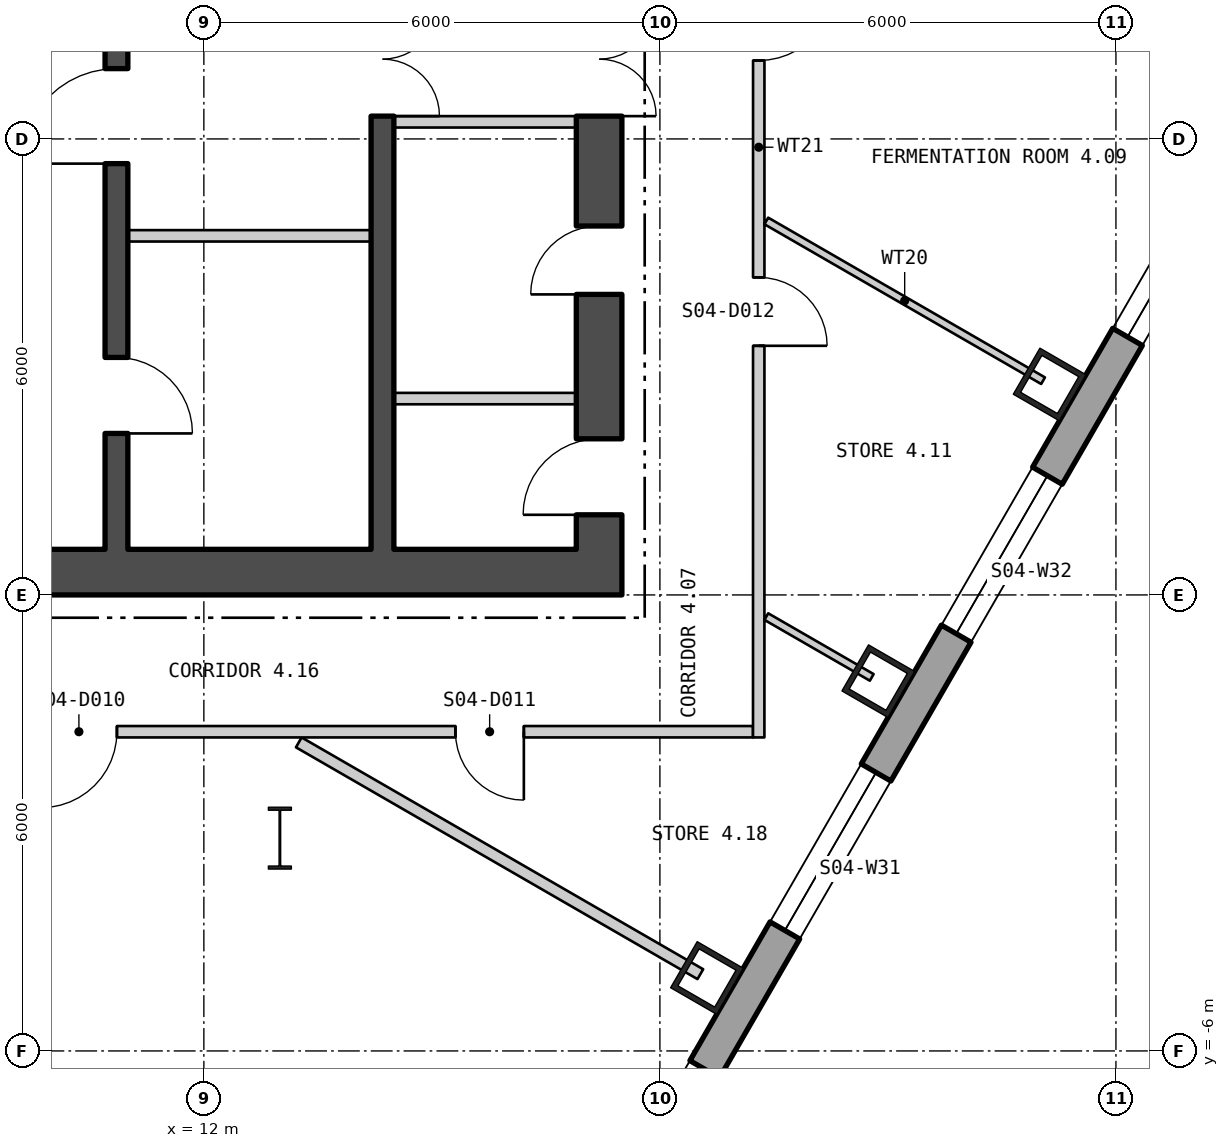
"""IFC4 building model, lengths in metres.
Left out: names, types, materials, properties, quantities, classifications, styles, units other than length and angle.
Written with IfcOpenShell. Run it as: python <this file> out.ifc"""

import sys

from ifc_helpers import new_model, si_unit, direction, frame, frame_2d, origin, origin_2d, place, context, subcontext, project, spatial, polyline, rectangle, hollow_rectangle, i_section, outline, extrude, element, fill, save


model = new_model("IFC4")
c1 = context("Model", 3, precision=1e-05, world=origin(), true_north=direction((0.0, 1.0)))
c2 = subcontext(c1, "Body", "Model", "MODEL_VIEW")
j1 = project(units=[si_unit("LENGTHUNIT", "METRE"), si_unit("PLANEANGLEUNIT", "RADIAN")], contexts=[c1])
p1 = place(None, origin())
s1 = spatial("IfcSite", under=j1, at=p1, CompositionType="ELEMENT")
p2 = place(p1, origin())
s2 = spatial("IfcBuilding", under=s1, at=p2, CompositionType="ELEMENT")
p3 = place(p2, frame((0.0, 0.0, 60.3)))
s3 = spatial("IfcBuildingStorey", under=s2, at=p3, CompositionType="ELEMENT", Elevation=60.3)
for number, where, z_axis, x_axis in (
    (1, (18.619, -5.04, 0.0), (0.0, 0.0, 1.0), (0.5, 0.866, 0.0)),
    (2, (20.873, -1.135, 0.0), (0.0, 0.0, 1.0), (0.5, 0.866, 0.0)),
    (3, (23.128, 2.769, 0.0), (0.0, 0.0, 1.0), (0.5, 0.866, 0.0)),
):
    element("IfcColumn", number, at=place(p3, frame(where, z_axis=z_axis, x_axis=x_axis)), inside=s3, PredefinedType="COLUMN", context=c2, shape_type="SweptSolid", body=[
        extrude(hollow_rectangle(XDim=0.7, YDim=0.7, WallThickness=0.07, at=origin_2d()), origin(), (0.0, 0.0, 1.0), 4.5),
    ])
p4 = place(p3, frame((13.0, -3.2, 0.0), z_axis=(0.0, 0.0, 1.0), x_axis=(1.0, 0.0, 0.0)))
e4 = element("IfcColumn", 4, at=p4, inside=s3, PredefinedType="COLUMN", context=c2, shape_type="SweptSolid", body=[
    extrude(i_section(OverallWidth=0.303, OverallDepth=0.814, WebThickness=0.021, FlangeThickness=0.04, at=origin_2d()), origin(), (0.0, 0.0, 1.0), 4.5),
])
p5 = place(p3, frame((5.425, -29.042, -0.18), z_axis=(0.0, 0.0, 1.0), x_axis=(0.499999388847, 0.866025756634, 0.0)))
e5 = element("IfcWall", 5, at=p5, inside=s3, PredefinedType="SOLIDWALL", context=c2, shape_type="SweptSolid", body=[
    extrude(outline(polyline([(-0.13, -0.225), (45.88, -0.225), (45.62, 0.225), (0.13, 0.225), (-0.13, -0.225)])), origin(), (0.0, 0.0, 1.0), 4.28),
])
p6 = place(p5, frame((1.425, 0.0, 1.08)))
e6 = element("IfcOpeningElement", 6, at=p6, cuts=e5, PredefinedType="OPENING", context=c2, shape_type="SweptSolid", body=[
    extrude(rectangle(XDim=2.4, YDim=2.6, at=frame_2d((1.2, 1.3))), frame((0.0, 0.235, 0.0), z_axis=(0.0, -1.0, 0.0), x_axis=(1.0, 0.0, 0.0)), (0.0, 0.0, 1.0), 0.47),
])
p7 = place(p5, frame((5.895, 0.0, 1.08)))
e7 = element("IfcOpeningElement", 7, at=p7, cuts=e5, PredefinedType="OPENING", context=c2, shape_type="SweptSolid", body=[
    extrude(rectangle(XDim=2.4, YDim=2.6, at=frame_2d((1.2, 1.3))), frame((0.0, 0.235, 0.0), z_axis=(0.0, -1.0, 0.0), x_axis=(1.0, 0.0, 0.0)), (0.0, 0.0, 1.0), 0.47),
])
p8 = place(p5, frame((10.403, 0.0, 1.08)))
e8 = element("IfcOpeningElement", 8, at=p8, cuts=e5, PredefinedType="OPENING", context=c2, shape_type="SweptSolid", body=[
    extrude(rectangle(XDim=2.4, YDim=2.6, at=frame_2d((1.2, 1.3))), frame((0.0, 0.235, 0.0), z_axis=(0.0, -1.0, 0.0), x_axis=(1.0, 0.0, 0.0)), (0.0, 0.0, 1.0), 0.47),
])
p9 = place(p5, frame((14.912, 0.0, 1.08)))
e9 = element("IfcOpeningElement", 9, at=p9, cuts=e5, PredefinedType="OPENING", context=c2, shape_type="SweptSolid", body=[
    extrude(rectangle(XDim=2.4, YDim=2.6, at=frame_2d((1.2, 1.3))), frame((0.0, 0.235, 0.0), z_axis=(0.0, -1.0, 0.0), x_axis=(1.0, 0.0, 0.0)), (0.0, 0.0, 1.0), 0.47),
])
p10 = place(p5, frame((19.421, 0.0, 1.08)))
e10 = element("IfcOpeningElement", 10, at=p10, cuts=e5, PredefinedType="OPENING", context=c2, shape_type="SweptSolid", body=[
    extrude(rectangle(XDim=2.4, YDim=2.6, at=frame_2d((1.2, 1.3))), frame((0.0, 0.235, 0.0), z_axis=(0.0, -1.0, 0.0), x_axis=(1.0, 0.0, 0.0)), (0.0, 0.0, 1.0), 0.47),
])
p11 = place(p5, frame((23.929, 0.0, 1.08)))
e11 = element("IfcOpeningElement", 11, at=p11, cuts=e5, PredefinedType="OPENING", context=c2, shape_type="SweptSolid", body=[
    extrude(rectangle(XDim=2.4, YDim=2.6, at=frame_2d((1.2, 1.3))), frame((0.0, 0.235, 0.0), z_axis=(0.0, -1.0, 0.0), x_axis=(1.0, 0.0, 0.0)), (0.0, 0.0, 1.0), 0.47),
])
p12 = place(p5, frame((28.438, 0.0, 1.08)))
e12 = element("IfcOpeningElement", 12, at=p12, cuts=e5, PredefinedType="OPENING", context=c2, shape_type="SweptSolid", body=[
    extrude(rectangle(XDim=2.4, YDim=2.6, at=frame_2d((1.2, 1.3))), frame((0.0, 0.235, 0.0), z_axis=(0.0, -1.0, 0.0), x_axis=(1.0, 0.0, 0.0)), (0.0, 0.0, 1.0), 0.47),
])
p13 = place(p5, frame((32.947, 0.0, 1.08)))
e13 = element("IfcOpeningElement", 13, at=p13, cuts=e5, PredefinedType="OPENING", context=c2, shape_type="SweptSolid", body=[
    extrude(rectangle(XDim=2.4, YDim=2.6, at=frame_2d((1.2, 1.3))), frame((0.0, 0.235, 0.0), z_axis=(0.0, -1.0, 0.0), x_axis=(1.0, 0.0, 0.0)), (0.0, 0.0, 1.0), 0.47),
])
p14 = place(p5, frame((37.455, 0.0, 1.08)))
e14 = element("IfcOpeningElement", 14, at=p14, cuts=e5, PredefinedType="OPENING", context=c2, shape_type="SweptSolid", body=[
    extrude(rectangle(XDim=2.4, YDim=2.6, at=frame_2d((1.2, 1.3))), frame((0.0, 0.235, 0.0), z_axis=(0.0, -1.0, 0.0), x_axis=(1.0, 0.0, 0.0)), (0.0, 0.0, 1.0), 0.47),
])
p15 = place(p5, frame((41.925, 0.0, 1.08)))
e15 = element("IfcOpeningElement", 15, at=p15, cuts=e5, PredefinedType="OPENING", context=c2, shape_type="SweptSolid", body=[
    extrude(rectangle(XDim=2.4, YDim=2.6, at=frame_2d((1.2, 1.3))), frame((0.0, 0.235, 0.0), z_axis=(0.0, -1.0, 0.0), x_axis=(1.0, 0.0, 0.0)), (0.0, 0.0, 1.0), 0.47),
])
p16 = place(p3, frame((-17.5, 0.3, 0.0), z_axis=(0.0, 0.0, 1.0), x_axis=(1.0, 0.0, 0.0)))
e16 = element("IfcWall", 16, at=p16, inside=s3, PredefinedType="SHEAR", context=c2, shape_type="SweptSolid", body=[
    extrude(rectangle(XDim=35.0, YDim=0.6, at=frame_2d((17.5, 0.0))), origin(), (0.0, 0.0, 1.0), 4.3),
])
p17 = place(p16, frame((12.0, 0.0, 0.0)))
e17 = element("IfcOpeningElement", 17, at=p17, cuts=e16, PredefinedType="OPENING", context=c2, shape_type="SweptSolid", body=[
    extrude(rectangle(XDim=1.8, YDim=2.4, at=frame_2d((0.9, 1.2))), frame((0.0, 0.31, 0.0), z_axis=(0.0, -1.0, 0.0), x_axis=(1.0, 0.0, 0.0)), (0.0, 0.0, 1.0), 0.62),
])
p18 = place(p16, frame((22.0, 0.0, 0.0)))
e18 = element("IfcOpeningElement", 18, at=p18, cuts=e16, PredefinedType="OPENING", context=c2, shape_type="SweptSolid", body=[
    extrude(rectangle(XDim=1.8, YDim=2.4, at=frame_2d((0.9, 1.2))), frame((0.0, 0.31, 0.0), z_axis=(0.0, -1.0, 0.0), x_axis=(1.0, 0.0, 0.0)), (0.0, 0.0, 1.0), 0.62),
])
p19 = place(p3, frame((17.2, 0.6, 0.0), z_axis=(0.0, 0.0, 1.0), x_axis=(0.0, 1.0, 0.0)))
e19 = element("IfcWall", 19, at=p19, inside=s3, PredefinedType="SHEAR", context=c2, shape_type="SweptSolid", body=[
    extrude(rectangle(XDim=16.8, YDim=0.6, at=frame_2d((8.4, 0.0))), origin(), (0.0, 0.0, 1.0), 4.3),
])
p20 = place(p19, frame((5.7, 0.0, 0.0)))
e20 = element("IfcOpeningElement", 20, at=p20, cuts=e19, PredefinedType="OPENING", context=c2, shape_type="SweptSolid", body=[
    extrude(rectangle(XDim=1.5, YDim=2.1, at=frame_2d((0.75, 1.05))), frame((0.0, 0.31, 0.0), z_axis=(0.0, -1.0, 0.0), x_axis=(1.0, 0.0, 0.0)), (0.0, 0.0, 1.0), 0.62),
])
p21 = place(p19, frame((0.454, 0.0, 0.0)))
e21 = element("IfcOpeningElement", 21, at=p21, cuts=e19, PredefinedType="OPENING", context=c2, shape_type="SweptSolid", body=[
    extrude(rectangle(XDim=1.0, YDim=2.1, at=frame_2d((0.5, 1.05))), frame((0.0, 0.31, 0.0), z_axis=(0.0, -1.0, 0.0), x_axis=(1.0, 0.0, 0.0)), (0.0, 0.0, 1.0), 0.62),
])
p22 = place(p19, frame((3.354, 0.0, 0.0)))
e22 = element("IfcOpeningElement", 22, at=p22, cuts=e19, PredefinedType="OPENING", context=c2, shape_type="SweptSolid", body=[
    extrude(rectangle(XDim=0.9, YDim=2.1, at=frame_2d((0.45, 1.05))), frame((0.0, 0.31, 0.0), z_axis=(0.0, -1.0, 0.0), x_axis=(1.0, 0.0, 0.0)), (0.0, 0.0, 1.0), 0.62),
])
p23 = place(p19, frame((10.527, 0.0, 0.0)))
e23 = element("IfcOpeningElement", 23, at=p23, cuts=e19, PredefinedType="OPENING", context=c2, shape_type="SweptSolid", body=[
    extrude(rectangle(XDim=0.9, YDim=2.1, at=frame_2d((0.45, 1.05))), frame((0.0, 0.31, 0.0), z_axis=(0.0, -1.0, 0.0), x_axis=(1.0, 0.0, 0.0)), (0.0, 0.0, 1.0), 0.62),
])
p24 = place(p19, frame((15.327, 0.0, 0.0)))
e24 = element("IfcOpeningElement", 24, at=p24, cuts=e19, PredefinedType="OPENING", context=c2, shape_type="SweptSolid", body=[
    extrude(rectangle(XDim=0.9, YDim=2.1, at=frame_2d((0.45, 1.05))), frame((0.0, 0.31, 0.0), z_axis=(0.0, -1.0, 0.0), x_axis=(1.0, 0.0, 0.0)), (0.0, 0.0, 1.0), 0.62),
])
p25 = place(p3, frame((10.85, 0.6, 0.0), z_axis=(0.0, 0.0, 1.0), x_axis=(0.0, 1.0, 0.0)))
e25 = element("IfcWall", 25, at=p25, inside=s3, PredefinedType="SHEAR", context=c2, shape_type="SweptSolid", body=[
    extrude(rectangle(XDim=16.8, YDim=0.3, at=frame_2d((8.4, 0.0))), origin(), (0.0, 0.0, 1.0), 4.3),
])
p26 = place(p25, frame((5.075, 0.0, 0.0)))
e26 = element("IfcOpeningElement", 26, at=p26, cuts=e25, PredefinedType="OPENING", context=c2, shape_type="SweptSolid", body=[
    extrude(rectangle(XDim=1.25, YDim=2.1, at=frame_2d((0.625, 1.05))), frame((0.0, 0.16, 0.0), z_axis=(0.0, -1.0, 0.0), x_axis=(1.0, 0.0, 0.0)), (0.0, 0.0, 1.0), 0.32),
])
p27 = place(p25, frame((1.525, 0.0, 0.0)))
e27 = element("IfcOpeningElement", 27, at=p27, cuts=e25, PredefinedType="OPENING", context=c2, shape_type="SweptSolid", body=[
    extrude(rectangle(XDim=1.0, YDim=2.1, at=frame_2d((0.5, 1.05))), frame((0.0, 0.16, 0.0), z_axis=(0.0, -1.0, 0.0), x_axis=(1.0, 0.0, 0.0)), (0.0, 0.0, 1.0), 0.32),
])
p28 = place(p3, frame((14.35, 0.6, 0.0), z_axis=(0.0, 0.0, 1.0), x_axis=(0.0, 1.0, 0.0)))
e28 = element("IfcWall", 28, at=p28, inside=s3, PredefinedType="SHEAR", context=c2, shape_type="SweptSolid", body=[
    extrude(rectangle(XDim=16.8, YDim=0.3, at=frame_2d((8.4, 0.0))), origin(), (0.0, 0.0, 1.0), 4.3),
])
p29 = place(p28, frame((5.7, 0.0, 0.0)))
e29 = element("IfcOpeningElement", 29, at=p29, cuts=e28, PredefinedType="OPENING", context=c2, shape_type="SweptSolid", body=[
    extrude(rectangle(XDim=1.5, YDim=2.1, at=frame_2d((0.75, 1.05))), frame((0.0, 0.16, 0.0), z_axis=(0.0, -1.0, 0.0), x_axis=(1.0, 0.0, 0.0)), (0.0, 0.0, 1.0), 0.32),
])
p30 = place(p3, frame((11.0, 4.725, 0.0), z_axis=(0.0, 0.0, 1.0), x_axis=(1.0, 0.0, 0.0)))
e30 = element("IfcWall", 30, at=p30, inside=s3, PredefinedType="PARTITIONING", context=c2, shape_type="SweptSolid", body=[
    extrude(rectangle(XDim=3.2, YDim=0.15, at=frame_2d((1.6, 0.0))), origin(), (0.0, 0.0, 1.0), 4.3),
])
for number, where, z_axis, x_axis in (
    (31, (14.5, 6.225, 0.0), (0.0, 0.0, 1.0), (1.0, 0.0, 0.0)),
    (32, (14.5, 2.583, 0.0), (0.0, 0.0, 1.0), (1.0, 0.0, 0.0)),
):
    element("IfcWall", number, at=place(p3, frame(where, z_axis=z_axis, x_axis=x_axis)), inside=s3, PredefinedType="PARTITIONING", context=c2, shape_type="SweptSolid", body=[
        extrude(rectangle(XDim=2.4, YDim=0.15, at=frame_2d((1.2, 0.0))), origin(), (0.0, 0.0, 1.0), 4.3),
    ])
p31 = place(p3, frame((7.855, -1.8, 0.0), z_axis=(0.0, 0.0, 1.0), x_axis=(1.0, 0.0, 0.0)))
e33 = element("IfcWall", 33, at=p31, inside=s3, PredefinedType="PARTITIONING", context=c2, shape_type="SweptSolid", body=[
    extrude(rectangle(XDim=11.37, YDim=0.15, at=frame_2d((5.685, 0.0))), origin(), (0.0, 0.0, 1.0), 4.3),
])
p32 = place(p31, frame((2.001, 0.0, 0.0)))
e34 = element("IfcOpeningElement", 34, at=p32, cuts=e33, PredefinedType="OPENING", context=c2, shape_type="SweptSolid", body=[
    extrude(rectangle(XDim=1.0, YDim=2.1, at=frame_2d((0.5, 1.05))), frame((0.0, 0.085, 0.0), z_axis=(0.0, -1.0, 0.0), x_axis=(1.0, 0.0, 0.0)), (0.0, 0.0, 1.0), 0.17),
])
p33 = place(p31, frame((7.455, 0.0, 0.0)))
e35 = element("IfcOpeningElement", 35, at=p33, cuts=e33, PredefinedType="OPENING", context=c2, shape_type="SweptSolid", body=[
    extrude(rectangle(XDim=0.9, YDim=2.1, at=frame_2d((0.45, 1.05))), frame((0.0, 0.085, 0.0), z_axis=(0.0, -1.0, 0.0), x_axis=(1.0, 0.0, 0.0)), (0.0, 0.0, 1.0), 0.17),
])
p34 = place(p3, frame((13.249, -1.94, 0.0), z_axis=(0.0, 0.0, 1.0), x_axis=(0.866035445757, -0.49998260639, 0.0)))
e36 = element("IfcWall", 36, at=p34, inside=s3, PredefinedType="PARTITIONING", context=c2, shape_type="SweptSolid", body=[
    extrude(rectangle(XDim=6.1, YDim=0.15, at=frame_2d((3.05, 0.0))), origin(), (0.0, 0.0, 1.0), 4.3),
])
p35 = place(p3, frame((19.3, -1.875, 0.0), z_axis=(0.0, 0.0, 1.0), x_axis=(6.4383209e-05, 0.999999997927, 0.0)))
e37 = element("IfcWall", 37, at=p35, inside=s3, PredefinedType="PARTITIONING", context=c2, shape_type="SweptSolid", body=[
    extrude(rectangle(XDim=15.532, YDim=0.15, at=frame_2d((7.766, 0.0))), origin(), (0.0, 0.0, 1.0), 4.3),
])
p36 = place(p35, frame((5.153, 0.0, 0.0)))
e38 = element("IfcOpeningElement", 38, at=p36, cuts=e37, PredefinedType="OPENING", context=c2, shape_type="SweptSolid", body=[
    extrude(rectangle(XDim=0.9, YDim=2.1, at=frame_2d((0.45, 1.05))), frame((0.0, 0.085, 0.0), z_axis=(0.0, -1.0, 0.0), x_axis=(1.0, 0.0, 0.0)), (0.0, 0.0, 1.0), 0.17),
])
p37 = place(p35, frame((8.907, 0.0, 0.0)))
e39 = element("IfcOpeningElement", 39, at=p37, cuts=e37, PredefinedType="OPENING", context=c2, shape_type="SweptSolid", body=[
    extrude(rectangle(XDim=1.0, YDim=2.1, at=frame_2d((0.5, 1.05))), frame((0.0, 0.085, 0.0), z_axis=(0.0, -1.0, 0.0), x_axis=(1.0, 0.0, 0.0)), (0.0, 0.0, 1.0), 0.17),
])
p38 = place(p35, frame((13.221, 0.0, 0.0)))
e40 = element("IfcOpeningElement", 40, at=p38, cuts=e37, PredefinedType="OPENING", context=c2, shape_type="SweptSolid", body=[
    extrude(rectangle(XDim=1.0, YDim=2.1, at=frame_2d((0.5, 1.05))), frame((0.0, 0.085, 0.0), z_axis=(0.0, -1.0, 0.0), x_axis=(1.0, 0.0, 0.0)), (0.0, 0.0, 1.0), 0.17),
])
p39 = place(p3, frame((19.4, -0.285, 0.0), z_axis=(0.0, 0.0, 1.0), x_axis=(0.866237568633, -0.499632339514, 0.0)))
e41 = element("IfcWall", 41, at=p39, inside=s3, PredefinedType="PARTITIONING", context=c2, shape_type="SweptSolid", body=[
    extrude(rectangle(XDim=1.601, YDim=0.1, at=frame_2d((0.801, 0.0))), origin(), (0.0, 0.0, 1.0), 4.3),
])
p40 = place(p3, frame((19.4, 4.921, 0.0), z_axis=(0.0, 0.0, 1.0), x_axis=(0.866039032844, -0.499976393034, 0.0)))
e42 = element("IfcWall", 42, at=p40, inside=s3, PredefinedType="PARTITIONING", context=c2, shape_type="SweptSolid", body=[
    extrude(rectangle(XDim=4.204, YDim=0.1, at=frame_2d((2.102, 0.0))), origin(), (0.0, 0.0, 1.0), 4.3),
])
p41 = place(p3, frame((19.401, 10.128, 0.0), z_axis=(0.0, 0.0, 1.0), x_axis=(0.865992313895, -0.50005730899, 0.0)))
e43 = element("IfcWall", 43, at=p41, inside=s3, PredefinedType="PARTITIONING", context=c2, shape_type="SweptSolid", body=[
    extrude(rectangle(XDim=6.807, YDim=0.1, at=frame_2d((3.404, 0.0))), origin(), (0.0, 0.0, 1.0), 4.3),
])
p42 = place(p11, origin())
e44 = element("IfcWindow", 44, at=p42, inside=s3, PartitioningType="SINGLE_PANEL", PredefinedType="WINDOW", context=c2, shape_type="SweptSolid", body=[
    extrude(rectangle(XDim=2.4, YDim=2.6, at=frame_2d((1.2, 1.3))), frame((0.0, 0.105, 0.0), z_axis=(0.0, -1.0, 0.0), x_axis=(1.0, 0.0, 0.0)), (0.0, 0.0, 1.0), 0.06),
])
fill(e11, e44)
p43 = place(p12, origin())
e45 = element("IfcWindow", 45, at=p43, inside=s3, PartitioningType="SINGLE_PANEL", PredefinedType="WINDOW", context=c2, shape_type="SweptSolid", body=[
    extrude(rectangle(XDim=2.4, YDim=2.6, at=frame_2d((1.2, 1.3))), frame((0.0, 0.105, 0.0), z_axis=(0.0, -1.0, 0.0), x_axis=(1.0, 0.0, 0.0)), (0.0, 0.0, 1.0), 0.06),
])
fill(e12, e45)
p44 = place(p13, origin())
e46 = element("IfcWindow", 46, at=p44, inside=s3, PartitioningType="SINGLE_PANEL", PredefinedType="WINDOW", context=c2, shape_type="SweptSolid", body=[
    extrude(rectangle(XDim=2.4, YDim=2.6, at=frame_2d((1.2, 1.3))), frame((0.0, 0.105, 0.0), z_axis=(0.0, -1.0, 0.0), x_axis=(1.0, 0.0, 0.0)), (0.0, 0.0, 1.0), 0.06),
])
fill(e13, e46)
p45 = place(p14, origin())
e47 = element("IfcWindow", 47, at=p45, inside=s3, PartitioningType="SINGLE_PANEL", PredefinedType="WINDOW", context=c2, shape_type="SweptSolid", body=[
    extrude(rectangle(XDim=2.4, YDim=2.6, at=frame_2d((1.2, 1.3))), frame((0.0, 0.105, 0.0), z_axis=(0.0, -1.0, 0.0), x_axis=(1.0, 0.0, 0.0)), (0.0, 0.0, 1.0), 0.06),
])
fill(e14, e47)
p46 = place(p26, origin())
e48 = element("IfcDoor", 48, at=p46, inside=s3, OperationType="SINGLE_SWING_RIGHT", PredefinedType="DOOR", context=c2, shape_type="SweptSolid", body=[
    extrude(rectangle(XDim=1.25, YDim=2.1, at=frame_2d((0.625, 1.05))), frame((0.0, 0.025, 0.0), z_axis=(0.0, -1.0, 0.0), x_axis=(1.0, 0.0, 0.0)), (0.0, 0.0, 1.0), 0.05),
])
fill(e26, e48)
p47 = place(p27, origin())
e49 = element("IfcDoor", 49, at=p47, inside=s3, OperationType="SINGLE_SWING_LEFT", PredefinedType="DOOR", context=c2, shape_type="SweptSolid", body=[
    extrude(rectangle(XDim=1.0, YDim=2.1, at=frame_2d((0.5, 1.05))), frame((0.0, 0.025, 0.0), z_axis=(0.0, -1.0, 0.0), x_axis=(1.0, 0.0, 0.0)), (0.0, 0.0, 1.0), 0.05),
])
fill(e27, e49)
p48 = place(p29, origin())
e50 = element("IfcDoor", 50, at=p48, inside=s3, OperationType="DOUBLE_DOOR_SINGLE_SWING", PredefinedType="DOOR", context=c2, shape_type="SweptSolid", body=[
    extrude(rectangle(XDim=1.5, YDim=2.1, at=frame_2d((0.75, 1.05))), frame((0.0, 0.025, 0.0), z_axis=(0.0, -1.0, 0.0), x_axis=(1.0, 0.0, 0.0)), (0.0, 0.0, 1.0), 0.05),
])
fill(e29, e50)
p49 = place(p20, origin())
e51 = element("IfcDoor", 51, at=p49, inside=s3, OperationType="DOUBLE_DOOR_SINGLE_SWING", PredefinedType="DOOR", context=c2, shape_type="SweptSolid", body=[
    extrude(rectangle(XDim=1.5, YDim=2.1, at=frame_2d((0.75, 1.05))), frame((0.0, 0.025, 0.0), z_axis=(0.0, -1.0, 0.0), x_axis=(1.0, 0.0, 0.0)), (0.0, 0.0, 1.0), 0.05),
])
fill(e20, e51)
p50 = place(p21, origin())
e52 = element("IfcDoor", 52, at=p50, inside=s3, OperationType="SINGLE_SWING_RIGHT", PredefinedType="DOOR", context=c2, shape_type="SweptSolid", body=[
    extrude(rectangle(XDim=1.0, YDim=2.1, at=frame_2d((0.5, 1.05))), frame((0.0, 0.025, 0.0), z_axis=(0.0, -1.0, 0.0), x_axis=(1.0, 0.0, 0.0)), (0.0, 0.0, 1.0), 0.05),
])
fill(e21, e52)
p51 = place(p22, origin())
e53 = element("IfcDoor", 53, at=p51, inside=s3, OperationType="SINGLE_SWING_RIGHT", PredefinedType="DOOR", context=c2, shape_type="SweptSolid", body=[
    extrude(rectangle(XDim=0.9, YDim=2.1, at=frame_2d((0.45, 1.05))), frame((0.0, 0.025, 0.0), z_axis=(0.0, -1.0, 0.0), x_axis=(1.0, 0.0, 0.0)), (0.0, 0.0, 1.0), 0.05),
])
fill(e22, e53)
p52 = place(p32, origin())
e54 = element("IfcDoor", 54, at=p52, inside=s3, OperationType="SINGLE_SWING_LEFT", PredefinedType="DOOR", context=c2, shape_type="SweptSolid", body=[
    extrude(rectangle(XDim=1.0, YDim=2.1, at=frame_2d((0.5, 1.05))), frame((0.0, 0.025, 0.0), z_axis=(0.0, -1.0, 0.0), x_axis=(1.0, 0.0, 0.0)), (0.0, 0.0, 1.0), 0.05),
])
fill(e34, e54)
p53 = place(p33, origin())
e55 = element("IfcDoor", 55, at=p53, inside=s3, OperationType="SINGLE_SWING_RIGHT", PredefinedType="DOOR", context=c2, shape_type="SweptSolid", body=[
    extrude(rectangle(XDim=0.9, YDim=2.1, at=frame_2d((0.45, 1.05))), frame((0.0, 0.025, 0.0), z_axis=(0.0, -1.0, 0.0), x_axis=(1.0, 0.0, 0.0)), (0.0, 0.0, 1.0), 0.05),
])
fill(e35, e55)
p54 = place(p36, origin())
e56 = element("IfcDoor", 56, at=p54, inside=s3, OperationType="SINGLE_SWING_LEFT", PredefinedType="DOOR", context=c2, shape_type="SweptSolid", body=[
    extrude(rectangle(XDim=0.9, YDim=2.1, at=frame_2d((0.45, 1.05))), frame((0.0, 0.025, 0.0), z_axis=(0.0, -1.0, 0.0), x_axis=(1.0, 0.0, 0.0)), (0.0, 0.0, 1.0), 0.05),
])
fill(e38, e56)
p55 = place(p37, origin())
e57 = element("IfcDoor", 57, at=p55, inside=s3, OperationType="SINGLE_SWING_RIGHT", PredefinedType="DOOR", context=c2, shape_type="SweptSolid", body=[
    extrude(rectangle(XDim=1.0, YDim=2.1, at=frame_2d((0.5, 1.05))), frame((0.0, 0.025, 0.0), z_axis=(0.0, -1.0, 0.0), x_axis=(1.0, 0.0, 0.0)), (0.0, 0.0, 1.0), 0.05),
])
fill(e39, e57)
save(model, sys.argv[1])
